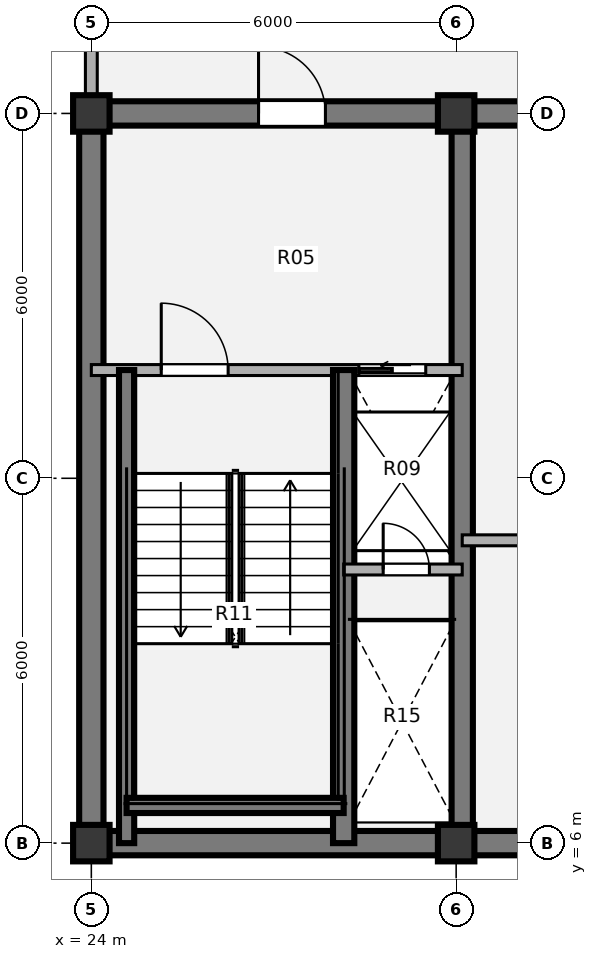
"""IFC4 building model, lengths in metres.
Left out: names, types, materials, properties, quantities, classifications, styles, units other than length and angle.
Written with IfcOpenShell. Run it as: python <this file> out.ifc"""

import sys

from ifc_helpers import new_model, si_unit, direction, frame, frame_2d, origin, origin_2d, place, context, subcontext, project, spatial, rectangle, extrude, source, transform, mapped, element, fill, save


model = new_model("IFC4")
c1 = context("Model", 3, precision=1e-05, world=origin(), true_north=direction((0.0, 1.0)))
c2 = subcontext(c1, "Body", "Model", "MODEL_VIEW")
j1 = project(units=[si_unit("LENGTHUNIT", "METRE"), si_unit("PLANEANGLEUNIT", "RADIAN")], contexts=[c1])
p1 = place(None, origin())
s1 = spatial("IfcSite", under=j1, at=p1, CompositionType="ELEMENT")
p2 = place(p1, origin())
s2 = spatial("IfcBuilding", under=s1, at=p2, CompositionType="ELEMENT")
p3 = place(p2, frame((0.0, 0.0, 307.8)))
s3 = spatial("IfcBuildingStorey", under=s2, at=p3, CompositionType="ELEMENT", Elevation=307.8)
m1 = source(origin(), c2, "Body", "SweptSolid", [
    extrude(rectangle(XDim=0.6, YDim=0.6, at=origin_2d()), origin(), (0.0, 0.0, 1.0), 3.96),
])
for number, where, z_axis, x_axis in (
    (1, (24.0, 6.0, 0.0), (0.0, 0.0, 1.0), (1.0, 0.0, 0.0)),
    (2, (30.0, 6.0, 0.0), (0.0, 0.0, 1.0), (1.0, 0.0, 0.0)),
    (3, (24.0, 18.0, 0.0), (0.0, 0.0, 1.0), (1.0, 0.0, 0.0)),
    (4, (30.0, 18.0, 0.0), (0.0, 0.0, 1.0), (1.0, 0.0, 0.0)),
):
    element("IfcColumn", number, at=place(p3, frame(where, z_axis=z_axis, x_axis=x_axis)), inside=s3, PredefinedType="COLUMN", context=c2, shape_type="MappedRepresentation", body=[
        mapped(m1, transform((0.0, 0.0, 0.0), x_axis=(1.0, 0.0, 0.0), y_axis=(0.0, 1.0, 0.0), z_axis=(0.0, 0.0, 1.0), scale=1.0)),
    ])
p4 = place(p3, frame((48.2, 6.0, 0.0), z_axis=(0.0, 0.0, 1.0), x_axis=(-1.0, 0.0, 0.0)))
e5 = element("IfcWall", 5, at=p4, inside=s3, PredefinedType="SHEAR", context=c2, shape_type="SweptSolid", body=[
    extrude(rectangle(XDim=24.4, YDim=0.4, at=frame_2d((12.2, 0.0))), origin(), (0.0, 0.0, 1.0), 3.96),
])
p5 = place(p3, frame((24.0, 6.0, 0.0), z_axis=(0.0, 0.0, 1.0), x_axis=(0.0, 1.0, 0.0)))
e6 = element("IfcWall", 6, at=p5, inside=s3, PredefinedType="SHEAR", context=c2, shape_type="SweptSolid", body=[
    extrude(rectangle(XDim=12.0, YDim=0.4, at=frame_2d((6.0, 0.0))), origin(), (0.0, 0.0, 1.0), 3.96),
])
p6 = place(p3, frame((23.8, 18.0, 0.0), z_axis=(0.0, 0.0, 1.0), x_axis=(1.0, 0.0, 0.0)))
e7 = element("IfcWall", 7, at=p6, inside=s3, PredefinedType="SHEAR", context=c2, shape_type="SweptSolid", body=[
    extrude(rectangle(XDim=9.4, YDim=0.4, at=frame_2d((4.7, 0.0))), origin(), (0.0, 0.0, 1.0), 3.96),
])
p7 = place(p6, frame((2.95, 0.0, 0.0)))
e8 = element("IfcOpeningElement", 8, at=p7, cuts=e7, PredefinedType="OPENING", context=c2, shape_type="SweptSolid", body=[
    extrude(rectangle(XDim=1.1, YDim=2.1, at=origin_2d()), frame((0.55, 0.21, 1.05), z_axis=(0.0, -1.0, 0.0), x_axis=(1.0, 0.0, 0.0)), (0.0, 0.0, 1.0), 0.42),
])
p8 = place(p3, frame((30.1, 6.0, 0.0), z_axis=(0.0, 0.0, 1.0), x_axis=(0.0, 1.0, 0.0)))
e9 = element("IfcWall", 9, at=p8, inside=s3, PredefinedType="SHEAR", context=c2, shape_type="SweptSolid", body=[
    extrude(rectangle(XDim=12.0, YDim=0.35, at=frame_2d((6.0, 0.0))), origin(), (0.0, 0.0, 1.0), 3.96),
])
p9 = place(p3, frame((24.0, 18.28, 0.0), z_axis=(0.0, 0.0, 1.0), x_axis=(0.0, 1.0, 0.0)))
e10 = element("IfcWall", 10, at=p9, inside=s3, PredefinedType="SOLIDWALL", context=c2, shape_type="SweptSolid", body=[
    extrude(rectangle(XDim=2.77, YDim=0.195, at=frame_2d((1.385, 0.0))), origin(), (0.0, 0.0, 1.0), 2.898),
])
p10 = place(p3, frame((30.1, 10.98, 0.0), z_axis=(0.0, 0.0, 1.0), x_axis=(1.0, 0.0, 0.0)))
e11 = element("IfcWall", 11, at=p10, inside=s3, PredefinedType="PARTITIONING", context=c2, shape_type="SweptSolid", body=[
    extrude(rectangle(XDim=4.08, YDim=0.18, at=frame_2d((2.04, 0.0))), origin(), (0.0, 0.0, 1.0), 3.68),
])
p11 = place(p3, frame((24.0, 13.78, 0.0), z_axis=(0.0, 0.0, 1.0), x_axis=(1.0, 0.0, 0.0)))
e12 = element("IfcWall", 12, at=p11, inside=s3, PredefinedType="PARTITIONING", context=c2, shape_type="SweptSolid", body=[
    extrude(rectangle(XDim=6.1, YDim=0.18, at=frame_2d((3.05, 0.0))), origin(), (0.0, 0.0, 1.0), 3.68),
])
p12 = place(p11, frame((1.15, 0.0, 0.0)))
e13 = element("IfcOpeningElement", 13, at=p12, cuts=e12, PredefinedType="OPENING", context=c2, shape_type="SweptSolid", body=[
    extrude(rectangle(XDim=1.1, YDim=2.1, at=origin_2d()), frame((0.55, 0.1, 1.05), z_axis=(0.0, -1.0, 0.0), x_axis=(1.0, 0.0, 0.0)), (0.0, 0.0, 1.0), 0.2),
])
p13 = place(p11, frame((4.4, 0.0, 0.0)))
e14 = element("IfcOpeningElement", 14, at=p13, cuts=e12, PredefinedType="OPENING", context=c2, shape_type="SweptSolid", body=[
    extrude(rectangle(XDim=1.1, YDim=2.1, at=origin_2d()), frame((0.55, 0.1, 1.05), z_axis=(0.0, -1.0, 0.0), x_axis=(1.0, 0.0, 0.0)), (0.0, 0.0, 1.0), 0.2),
])
p14 = place(p3, frame((28.15, 6.0, 0.0), z_axis=(0.0, 0.0, 1.0), x_axis=(0.0, 1.0, 0.0)))
e15 = element("IfcWall", 15, at=p14, inside=s3, PredefinedType="SHEAR", context=c2, shape_type="SweptSolid", body=[
    extrude(rectangle(XDim=7.78, YDim=0.35, at=frame_2d((3.89, 0.0))), origin(), (0.0, 0.0, 1.0), 4.03),
])
p15 = place(p3, frame((24.58, 6.0, 0.0), z_axis=(0.0, 0.0, 1.0), x_axis=(0.0, 1.0, 0.0)))
e16 = element("IfcWall", 16, at=p15, inside=s3, PredefinedType="SHEAR", context=c2, shape_type="SweptSolid", body=[
    extrude(rectangle(XDim=7.78, YDim=0.25, at=frame_2d((3.89, 0.0))), origin(), (0.0, 0.0, 1.0), 4.03),
])
p16 = place(p3, frame((24.58, 6.62, 0.0), z_axis=(0.0, 0.0, 1.0), x_axis=(1.0, 0.0, 0.0)))
e17 = element("IfcWall", 17, at=p16, inside=s3, PredefinedType="SHEAR", context=c2, shape_type="SweptSolid", body=[
    extrude(rectangle(XDim=3.57, YDim=0.25, at=frame_2d((1.785, 0.0))), origin(), (0.0, 0.0, 1.0), 4.03),
])
p17 = place(p3, frame((28.15, 10.5, 0.0), z_axis=(0.0, 0.0, 1.0), x_axis=(1.0, 0.0, 0.0)))
e18 = element("IfcWall", 18, at=p17, inside=s3, PredefinedType="PARTITIONING", context=c2, shape_type="SweptSolid", body=[
    extrude(rectangle(XDim=1.95, YDim=0.18, at=frame_2d((0.975, 0.0))), origin(), (0.0, 0.0, 1.0), 3.68),
])
p18 = place(p17, frame((0.65, 0.0, 0.0)))
e19 = element("IfcOpeningElement", 19, at=p18, cuts=e18, PredefinedType="OPENING", context=c2, shape_type="SweptSolid", body=[
    extrude(rectangle(XDim=0.76, YDim=2.05, at=origin_2d()), frame((0.38, 0.1, 1.025), z_axis=(0.0, -1.0, 0.0), x_axis=(1.0, 0.0, 0.0)), (0.0, 0.0, 1.0), 0.2),
])
m2 = source(origin(), c2, "Body", "SweptSolid", [
    extrude(rectangle(XDim=1.1, YDim=2.1, at=origin_2d()), frame((0.55, 0.025, 1.05), z_axis=(0.0, -1.0, 0.0), x_axis=(1.0, 0.0, 0.0)), (0.0, 0.0, 1.0), 0.05),
])
p19 = place(p12, origin())
e20 = element("IfcDoor", 20, at=p19, inside=s3, OperationType="SINGLE_SWING_LEFT", PredefinedType="DOOR", context=c2, shape_type="MappedRepresentation", body=[
    mapped(m2, transform((0.0, 0.0, 0.0), x_axis=(1.0, 0.0, 0.0), y_axis=(0.0, 1.0, 0.0), z_axis=(0.0, 0.0, 1.0), scale=1.0)),
])
fill(e13, e20)
m3 = source(origin(), c2, "Body", "SweptSolid", [
    extrude(rectangle(XDim=1.1, YDim=2.1, at=origin_2d()), frame((0.55, 0.025, 1.05), z_axis=(0.0, -1.0, 0.0), x_axis=(1.0, 0.0, 0.0)), (0.0, 0.0, 1.0), 0.05),
])
p20 = place(p13, origin())
e21 = element("IfcDoor", 21, at=p20, inside=s3, OperationType="SLIDING_TO_LEFT", PredefinedType="DOOR", context=c2, shape_type="MappedRepresentation", body=[
    mapped(m3, transform((0.0, 0.0, 0.0), x_axis=(1.0, 0.0, 0.0), y_axis=(0.0, 1.0, 0.0), z_axis=(0.0, 0.0, 1.0), scale=1.0)),
])
fill(e14, e21)
m4 = source(origin(), c2, "Body", "SweptSolid", [
    extrude(rectangle(XDim=0.76, YDim=2.05, at=origin_2d()), frame((0.38, 0.025, 1.025), z_axis=(0.0, -1.0, 0.0), x_axis=(1.0, 0.0, 0.0)), (0.0, 0.0, 1.0), 0.05),
])
p21 = place(p18, origin())
e22 = element("IfcDoor", 22, at=p21, inside=s3, OperationType="SINGLE_SWING_LEFT", PredefinedType="DOOR", context=c2, shape_type="MappedRepresentation", body=[
    mapped(m4, transform((0.0, 0.0, 0.0), x_axis=(1.0, 0.0, 0.0), y_axis=(0.0, 1.0, 0.0), z_axis=(0.0, 0.0, 1.0), scale=1.0)),
])
fill(e19, e22)
m5 = source(origin(), c2, "Body", "SweptSolid", [
    extrude(rectangle(XDim=1.1, YDim=2.1, at=origin_2d()), frame((0.55, 0.025, 1.05), z_axis=(0.0, -1.0, 0.0), x_axis=(1.0, 0.0, 0.0)), (0.0, 0.0, 1.0), 0.05),
])
p22 = place(p7, origin())
e23 = element("IfcDoor", 23, at=p22, inside=s3, OperationType="SINGLE_SWING_LEFT", PredefinedType="DOOR", context=c2, shape_type="MappedRepresentation", body=[
    mapped(m5, transform((0.0, 0.0, 0.0), x_axis=(1.0, 0.0, 0.0), y_axis=(0.0, 1.0, 0.0), z_axis=(0.0, 0.0, 1.0), scale=1.0)),
])
fill(e8, e23)
save(model, sys.argv[1])
